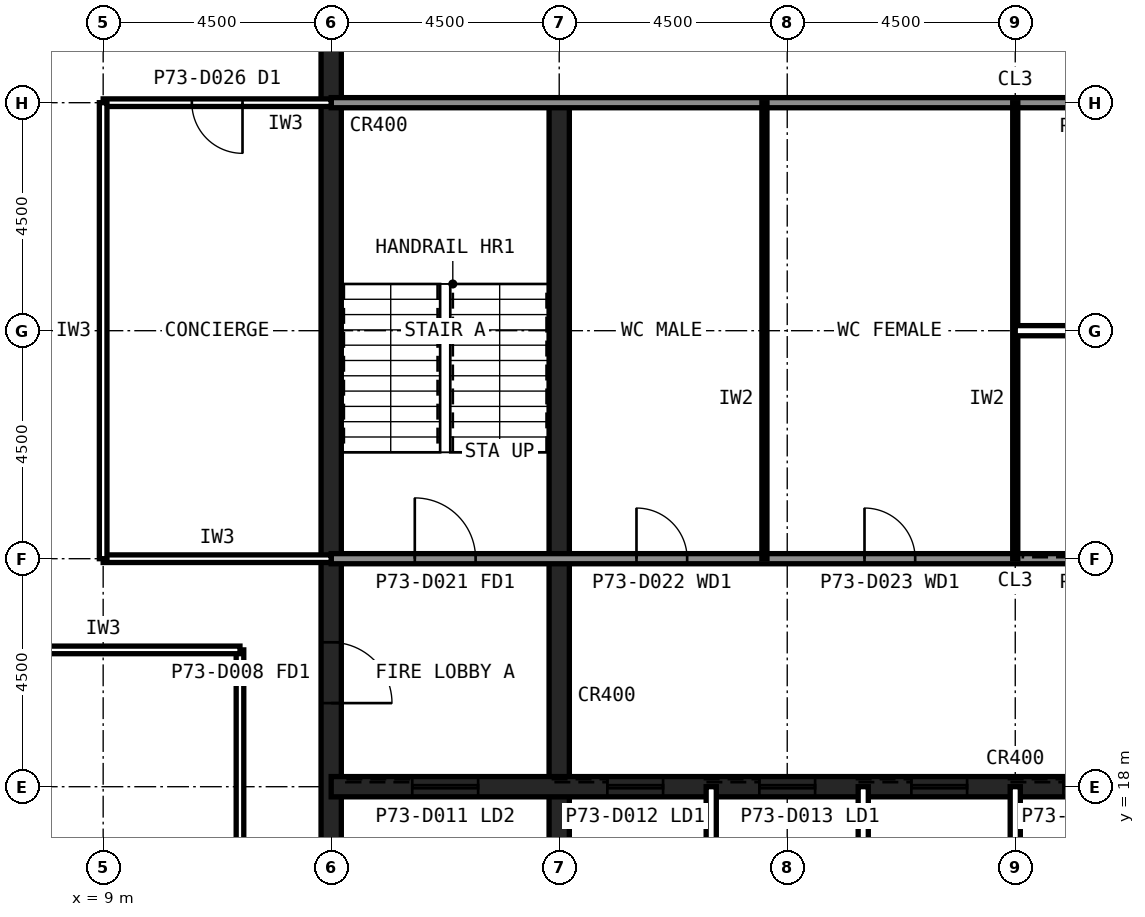
"""IFC4 building model, lengths in metres.
Left out: names, types, materials, properties, quantities, classifications, styles, units other than length and angle.
Written with IfcOpenShell. Run it as: python <this file> out.ifc"""

import sys

from ifc_helpers import new_model, si_unit, direction, frame, frame_2d, origin, place, context, subcontext, project, spatial, rectangle, extrude, element, fill, save


model = new_model("IFC4")
c1 = context("Model", 3, precision=1e-05, world=origin(), true_north=direction((0.0, 1.0)))
c2 = subcontext(c1, "Body", "Model", "MODEL_VIEW")
j1 = project(units=[si_unit("LENGTHUNIT", "METRE"), si_unit("PLANEANGLEUNIT", "RADIAN")], contexts=[c1])
p1 = place(None, origin())
s1 = spatial("IfcSite", under=j1, at=p1, CompositionType="ELEMENT")
p2 = place(p1, origin())
s2 = spatial("IfcBuilding", under=s1, at=p2, CompositionType="ELEMENT")
p3 = place(p2, frame((0.0, 0.0, 302.6)))
s3 = spatial("IfcBuildingStorey", under=s2, at=p3, CompositionType="ELEMENT", Elevation=302.6)
p4 = place(p3, frame((13.5, 40.5, 0.0), z_axis=(0.0, 0.0, 1.0), x_axis=(0.0, -1.0, 0.0)))
e1 = element("IfcWall", 1, at=p4, inside=s3, PredefinedType="SHEAR", context=c2, shape_type="SweptSolid", body=[
    extrude(rectangle(XDim=27.0, YDim=0.4, at=frame_2d((13.5, 0.0))), origin(), (0.0, 0.0, 1.0), 4.0),
])
p5 = place(p4, frame((19.65, 0.0, 0.0)))
e2 = element("IfcOpeningElement", 2, at=p5, cuts=e1, PredefinedType="OPENING", context=c2, shape_type="SweptSolid", body=[
    extrude(rectangle(XDim=1.2, YDim=2.1, at=frame_2d((0.6, 1.05))), frame((0.0, 0.21, 0.0), z_axis=(0.0, -1.0, 0.0), x_axis=(1.0, 0.0, 0.0)), (0.0, 0.0, 1.0), 0.42),
])
p6 = place(p4, frame((5.85, 0.0, 0.0)))
e3 = element("IfcOpeningElement", 3, at=p6, cuts=e1, PredefinedType="OPENING", context=c2, shape_type="SweptSolid", body=[
    extrude(rectangle(XDim=1.8, YDim=2.1, at=frame_2d((0.9, 1.05))), frame((0.0, 0.21, 0.0), z_axis=(0.0, -1.0, 0.0), x_axis=(1.0, 0.0, 0.0)), (0.0, 0.0, 1.0), 0.42),
])
p7 = place(p3, frame((18.0, 13.5, 0.0), z_axis=(0.0, 0.0, 1.0), x_axis=(0.0, 1.0, 0.0)))
e4 = element("IfcWall", 4, at=p7, inside=s3, PredefinedType="SHEAR", context=c2, shape_type="SweptSolid", body=[
    extrude(rectangle(XDim=18.0, YDim=0.4, at=frame_2d((9.0, 0.0))), origin(), (0.0, 0.0, 1.0), 4.0),
])
p8 = place(p3, frame((13.5, 18.0, 0.0), z_axis=(0.0, 0.0, 1.0), x_axis=(1.0, 0.0, 0.0)))
e5 = element("IfcWall", 5, at=p8, inside=s3, PredefinedType="SHEAR", context=c2, shape_type="SweptSolid", body=[
    extrude(rectangle(XDim=27.0, YDim=0.4, at=frame_2d((13.5, 0.0))), origin(), (0.0, 0.0, 1.0), 4.0),
])
p9 = place(p8, frame((24.3, 0.0, 0.0)))
e6 = element("IfcOpeningElement", 6, at=p9, cuts=e5, PredefinedType="OPENING", context=c2, shape_type="SweptSolid", body=[
    extrude(rectangle(XDim=0.9, YDim=2.1, at=frame_2d((0.45, 1.05))), frame((0.0, 0.21, 0.0), z_axis=(0.0, -1.0, 0.0), x_axis=(1.0, 0.0, 0.0)), (0.0, 0.0, 1.0), 0.42),
])
p10 = place(p8, frame((5.45, 0.0, 0.0)))
e7 = element("IfcOpeningElement", 7, at=p10, cuts=e5, PredefinedType="OPENING", context=c2, shape_type="SweptSolid", body=[
    extrude(rectangle(XDim=1.1, YDim=2.1, at=frame_2d((0.55, 1.05))), frame((0.0, 0.21, 0.0), z_axis=(0.0, -1.0, 0.0), x_axis=(1.0, 0.0, 0.0)), (0.0, 0.0, 1.0), 0.42),
])
p11 = place(p8, frame((8.45, 0.0, 0.0)))
e8 = element("IfcOpeningElement", 8, at=p11, cuts=e5, PredefinedType="OPENING", context=c2, shape_type="SweptSolid", body=[
    extrude(rectangle(XDim=1.1, YDim=2.1, at=frame_2d((0.55, 1.05))), frame((0.0, 0.21, 0.0), z_axis=(0.0, -1.0, 0.0), x_axis=(1.0, 0.0, 0.0)), (0.0, 0.0, 1.0), 0.42),
])
p12 = place(p8, frame((11.45, 0.0, 0.0)))
e9 = element("IfcOpeningElement", 9, at=p12, cuts=e5, PredefinedType="OPENING", context=c2, shape_type="SweptSolid", body=[
    extrude(rectangle(XDim=1.1, YDim=2.1, at=frame_2d((0.55, 1.05))), frame((0.0, 0.21, 0.0), z_axis=(0.0, -1.0, 0.0), x_axis=(1.0, 0.0, 0.0)), (0.0, 0.0, 1.0), 0.42),
])
p13 = place(p8, frame((14.45, 0.0, 0.0)))
e10 = element("IfcOpeningElement", 10, at=p13, cuts=e5, PredefinedType="OPENING", context=c2, shape_type="SweptSolid", body=[
    extrude(rectangle(XDim=1.1, YDim=2.1, at=frame_2d((0.55, 1.05))), frame((0.0, 0.21, 0.0), z_axis=(0.0, -1.0, 0.0), x_axis=(1.0, 0.0, 0.0)), (0.0, 0.0, 1.0), 0.42),
])
p14 = place(p8, frame((17.45, 0.0, 0.0)))
e11 = element("IfcOpeningElement", 11, at=p14, cuts=e5, PredefinedType="OPENING", context=c2, shape_type="SweptSolid", body=[
    extrude(rectangle(XDim=1.1, YDim=2.1, at=frame_2d((0.55, 1.05))), frame((0.0, 0.21, 0.0), z_axis=(0.0, -1.0, 0.0), x_axis=(1.0, 0.0, 0.0)), (0.0, 0.0, 1.0), 0.42),
])
p15 = place(p8, frame((20.45, 0.0, 0.0)))
e12 = element("IfcOpeningElement", 12, at=p15, cuts=e5, PredefinedType="OPENING", context=c2, shape_type="SweptSolid", body=[
    extrude(rectangle(XDim=1.1, YDim=2.1, at=frame_2d((0.55, 1.05))), frame((0.0, 0.21, 0.0), z_axis=(0.0, -1.0, 0.0), x_axis=(1.0, 0.0, 0.0)), (0.0, 0.0, 1.0), 0.42),
])
p16 = place(p8, frame((1.6, 0.0, 0.0)))
e13 = element("IfcOpeningElement", 13, at=p16, cuts=e5, PredefinedType="OPENING", context=c2, shape_type="SweptSolid", body=[
    extrude(rectangle(XDim=1.3, YDim=2.2, at=frame_2d((0.65, 1.1))), frame((0.0, 0.21, 0.0), z_axis=(0.0, -1.0, 0.0), x_axis=(1.0, 0.0, 0.0)), (0.0, 0.0, 1.0), 0.42),
])
p17 = place(p3, frame((13.5, 22.5, 0.0), z_axis=(0.0, 0.0, 1.0), x_axis=(1.0, 0.0, 0.0)))
e14 = element("IfcWall", 14, at=p17, inside=s3, PredefinedType="SOLIDWALL", context=c2, shape_type="SweptSolid", body=[
    extrude(rectangle(XDim=27.0, YDim=0.2, at=frame_2d((13.5, 0.0))), origin(), (0.0, 0.0, 1.0), 3.84),
])
p18 = place(p17, frame((1.65, 0.0, 0.0)))
e15 = element("IfcOpeningElement", 15, at=p18, cuts=e14, PredefinedType="OPENING", context=c2, shape_type="SweptSolid", body=[
    extrude(rectangle(XDim=1.2, YDim=2.1, at=frame_2d((0.6, 1.05))), frame((0.0, 0.11, 0.0), z_axis=(0.0, -1.0, 0.0), x_axis=(1.0, 0.0, 0.0)), (0.0, 0.0, 1.0), 0.22),
])
p19 = place(p17, frame((6.025, 0.0, 0.0)))
e16 = element("IfcOpeningElement", 16, at=p19, cuts=e14, PredefinedType="OPENING", context=c2, shape_type="SweptSolid", body=[
    extrude(rectangle(XDim=1.0, YDim=2.1, at=frame_2d((0.5, 1.05))), frame((0.0, 0.11, 0.0), z_axis=(0.0, -1.0, 0.0), x_axis=(1.0, 0.0, 0.0)), (0.0, 0.0, 1.0), 0.22),
])
p20 = place(p17, frame((10.525, 0.0, 0.0)))
e17 = element("IfcOpeningElement", 17, at=p20, cuts=e14, PredefinedType="OPENING", context=c2, shape_type="SweptSolid", body=[
    extrude(rectangle(XDim=1.0, YDim=2.1, at=frame_2d((0.5, 1.05))), frame((0.0, 0.11, 0.0), z_axis=(0.0, -1.0, 0.0), x_axis=(1.0, 0.0, 0.0)), (0.0, 0.0, 1.0), 0.22),
])
p21 = place(p17, frame((19.75, 0.0, 0.0)))
e18 = element("IfcOpeningElement", 18, at=p21, cuts=e14, PredefinedType="OPENING", context=c2, shape_type="SweptSolid", body=[
    extrude(rectangle(XDim=1.0, YDim=2.1, at=frame_2d((0.5, 1.05))), frame((0.0, 0.11, 0.0), z_axis=(0.0, -1.0, 0.0), x_axis=(1.0, 0.0, 0.0)), (0.0, 0.0, 1.0), 0.22),
])
p22 = place(p17, frame((15.05, 0.0, 0.0)))
e19 = element("IfcOpeningElement", 19, at=p22, cuts=e14, PredefinedType="OPENING", context=c2, shape_type="SweptSolid", body=[
    extrude(rectangle(XDim=1.4, YDim=2.4, at=frame_2d((0.7, 1.2))), frame((0.0, 0.11, 0.0), z_axis=(0.0, -1.0, 0.0), x_axis=(1.0, 0.0, 0.0)), (0.0, 0.0, 1.0), 0.22),
])
p23 = place(p3, frame((13.5, 31.5, 0.0), z_axis=(0.0, 0.0, 1.0), x_axis=(1.0, 0.0, 0.0)))
e20 = element("IfcWall", 20, at=p23, inside=s3, PredefinedType="SOLIDWALL", context=c2, shape_type="SweptSolid", body=[
    extrude(rectangle(XDim=27.0, YDim=0.2, at=frame_2d((13.5, 0.0))), origin(), (0.0, 0.0, 1.0), 3.84),
])
p24 = place(p23, frame((24.15, 0.0, 0.0)))
e21 = element("IfcOpeningElement", 21, at=p24, cuts=e20, PredefinedType="OPENING", context=c2, shape_type="SweptSolid", body=[
    extrude(rectangle(XDim=1.2, YDim=2.1, at=frame_2d((0.6, 1.05))), frame((0.0, 0.11, 0.0), z_axis=(0.0, -1.0, 0.0), x_axis=(1.0, 0.0, 0.0)), (0.0, 0.0, 1.0), 0.22),
])
p25 = place(p23, frame((15.3, 0.0, 0.0)))
e22 = element("IfcOpeningElement", 22, at=p25, cuts=e20, PredefinedType="OPENING", context=c2, shape_type="SweptSolid", body=[
    extrude(rectangle(XDim=0.9, YDim=2.1, at=frame_2d((0.45, 1.05))), frame((0.0, 0.11, 0.0), z_axis=(0.0, -1.0, 0.0), x_axis=(1.0, 0.0, 0.0)), (0.0, 0.0, 1.0), 0.22),
])
p26 = place(p23, frame((19.8, 0.0, 0.0)))
e23 = element("IfcOpeningElement", 23, at=p26, cuts=e20, PredefinedType="OPENING", context=c2, shape_type="SweptSolid", body=[
    extrude(rectangle(XDim=0.9, YDim=2.1, at=frame_2d((0.45, 1.05))), frame((0.0, 0.11, 0.0), z_axis=(0.0, -1.0, 0.0), x_axis=(1.0, 0.0, 0.0)), (0.0, 0.0, 1.0), 0.22),
])
for number, where, z_axis, x_axis in (
    (24, (21.0, 13.5, 0.0), (0.0, 0.0, 1.0), (0.0, 1.0, 0.0)),
    (25, (24.0, 13.5, 0.0), (0.0, 0.0, 1.0), (0.0, 1.0, 0.0)),
    (26, (27.0, 13.5, 0.0), (0.0, 0.0, 1.0), (0.0, 1.0, 0.0)),
):
    element("IfcWall", number, at=place(p3, frame(where, z_axis=z_axis, x_axis=x_axis)), inside=s3, PredefinedType="PARTITIONING", context=c2, shape_type="SweptSolid", body=[
        extrude(rectangle(XDim=4.5, YDim=0.2, at=frame_2d((2.25, 0.0))), origin(), (0.0, 0.0, 1.0), 3.84),
    ])
for number, where, z_axis, x_axis in (
    (27, (22.05, 22.5, 0.0), (0.0, 0.0, 1.0), (0.0, 1.0, 0.0)),
    (28, (27.0, 22.5, 0.0), (0.0, 0.0, 1.0), (0.0, 1.0, 0.0)),
):
    element("IfcWall", number, at=place(p3, frame(where, z_axis=z_axis, x_axis=x_axis)), inside=s3, PredefinedType="PLUMBINGWALL", context=c2, shape_type="SweptSolid", body=[
        extrude(rectangle(XDim=9.0, YDim=0.1, at=frame_2d((4.5, 0.0))), origin(), (0.0, 0.0, 1.0), 3.84),
    ])
p27 = place(p3, frame((27.0, 27.0, 0.0), z_axis=(0.0, 0.0, 1.0), x_axis=(1.0, 0.0, 0.0)))
e29 = element("IfcWall", 29, at=p27, inside=s3, PredefinedType="PARTITIONING", context=c2, shape_type="SweptSolid", body=[
    extrude(rectangle(XDim=9.0, YDim=0.2, at=frame_2d((4.5, 0.0))), origin(), (0.0, 0.0, 1.0), 3.84),
])
p28 = place(p3, frame((11.7, 20.7, 0.0), z_axis=(0.0, 0.0, 1.0), x_axis=(0.0, -1.0, 0.0)))
e30 = element("IfcWall", 30, at=p28, inside=s3, PredefinedType="PARTITIONING", context=c2, shape_type="SweptSolid", body=[
    extrude(rectangle(XDim=9.0, YDim=0.15, at=frame_2d((4.5, 0.0))), origin(), (0.0, 0.0, 1.0), 3.84),
])
p29 = place(p3, frame((6.3, 20.7, 0.0), z_axis=(0.0, 0.0, 1.0), x_axis=(1.0, 0.0, 0.0)))
e31 = element("IfcWall", 31, at=p29, inside=s3, PredefinedType="PARTITIONING", context=c2, shape_type="SweptSolid", body=[
    extrude(rectangle(XDim=5.4, YDim=0.15, at=frame_2d((2.7, 0.0))), origin(), (0.0, 0.0, 1.0), 3.84),
])
p30 = place(p3, frame((9.0, 22.5, 0.0), z_axis=(0.0, 0.0, 1.0), x_axis=(1.0, 0.0, 0.0)))
e32 = element("IfcWall", 32, at=p30, inside=s3, PredefinedType="PARTITIONING", context=c2, shape_type="SweptSolid", body=[
    extrude(rectangle(XDim=4.5, YDim=0.15, at=frame_2d((2.25, 0.0))), origin(), (0.0, 0.0, 1.0), 2.989),
])
p31 = place(p3, frame((13.5, 31.5, 0.0), z_axis=(0.0, 0.0, 1.0), x_axis=(-1.0, 0.0, 0.0)))
e33 = element("IfcWall", 33, at=p31, inside=s3, PredefinedType="PARTITIONING", context=c2, shape_type="SweptSolid", body=[
    extrude(rectangle(XDim=4.5, YDim=0.15, at=frame_2d((2.25, 0.0))), origin(), (0.0, 0.0, 1.0), 2.989),
])
p32 = place(p31, frame((1.75, 0.0, 0.0)))
e34 = element("IfcOpeningElement", 34, at=p32, cuts=e33, PredefinedType="OPENING", context=c2, shape_type="SweptSolid", body=[
    extrude(rectangle(XDim=1.0, YDim=2.1, at=frame_2d((0.5, 1.05))), frame((0.0, 0.085, 0.0), z_axis=(0.0, -1.0, 0.0), x_axis=(1.0, 0.0, 0.0)), (0.0, 0.0, 1.0), 0.17),
])
p33 = place(p3, frame((9.0, 31.5, 0.0), z_axis=(0.0, 0.0, 1.0), x_axis=(0.0, -1.0, 0.0)))
e35 = element("IfcWall", 35, at=p33, inside=s3, PredefinedType="PARTITIONING", context=c2, shape_type="SweptSolid", body=[
    extrude(rectangle(XDim=9.0, YDim=0.15, at=frame_2d((4.5, 0.0))), origin(), (0.0, 0.0, 1.0), 3.84),
])
p34 = place(p5, origin())
e36 = element("IfcDoor", 36, at=p34, inside=s3, OperationType="SINGLE_SWING_RIGHT", PredefinedType="DOOR", context=c2, shape_type="SweptSolid", body=[
    extrude(rectangle(XDim=1.2, YDim=2.1, at=frame_2d((0.6, 1.05))), frame((0.0, 0.025, 0.0), z_axis=(0.0, -1.0, 0.0), x_axis=(1.0, 0.0, 0.0)), (0.0, 0.0, 1.0), 0.05),
])
fill(e2, e36)
p35 = place(p18, origin())
e37 = element("IfcDoor", 37, at=p35, inside=s3, OperationType="SINGLE_SWING_LEFT", PredefinedType="DOOR", context=c2, shape_type="SweptSolid", body=[
    extrude(rectangle(XDim=1.2, YDim=2.1, at=frame_2d((0.6, 1.05))), frame((0.0, 0.025, 0.0), z_axis=(0.0, -1.0, 0.0), x_axis=(1.0, 0.0, 0.0)), (0.0, 0.0, 1.0), 0.05),
])
fill(e15, e37)
p36 = place(p19, origin())
e38 = element("IfcDoor", 38, at=p36, inside=s3, OperationType="SINGLE_SWING_LEFT", PredefinedType="DOOR", context=c2, shape_type="SweptSolid", body=[
    extrude(rectangle(XDim=1.0, YDim=2.1, at=frame_2d((0.5, 1.05))), frame((0.0, 0.025, 0.0), z_axis=(0.0, -1.0, 0.0), x_axis=(1.0, 0.0, 0.0)), (0.0, 0.0, 1.0), 0.05),
])
fill(e16, e38)
p37 = place(p20, origin())
e39 = element("IfcDoor", 39, at=p37, inside=s3, OperationType="SINGLE_SWING_LEFT", PredefinedType="DOOR", context=c2, shape_type="SweptSolid", body=[
    extrude(rectangle(XDim=1.0, YDim=2.1, at=frame_2d((0.5, 1.05))), frame((0.0, 0.025, 0.0), z_axis=(0.0, -1.0, 0.0), x_axis=(1.0, 0.0, 0.0)), (0.0, 0.0, 1.0), 0.05),
])
fill(e17, e39)
p38 = place(p10, origin())
e40 = element("IfcDoor", 40, at=p38, inside=s3, OperationType="SLIDING_TO_LEFT", PredefinedType="DOOR", context=c2, shape_type="SweptSolid", body=[
    extrude(rectangle(XDim=1.1, YDim=2.1, at=frame_2d((0.55, 1.05))), frame((0.0, 0.025, 0.0), z_axis=(0.0, -1.0, 0.0), x_axis=(1.0, 0.0, 0.0)), (0.0, 0.0, 1.0), 0.05),
])
fill(e7, e40)
p39 = place(p11, origin())
e41 = element("IfcDoor", 41, at=p39, inside=s3, OperationType="SLIDING_TO_LEFT", PredefinedType="DOOR", context=c2, shape_type="SweptSolid", body=[
    extrude(rectangle(XDim=1.1, YDim=2.1, at=frame_2d((0.55, 1.05))), frame((0.0, 0.025, 0.0), z_axis=(0.0, -1.0, 0.0), x_axis=(1.0, 0.0, 0.0)), (0.0, 0.0, 1.0), 0.05),
])
fill(e8, e41)
p40 = place(p12, origin())
e42 = element("IfcDoor", 42, at=p40, inside=s3, OperationType="SLIDING_TO_LEFT", PredefinedType="DOOR", context=c2, shape_type="SweptSolid", body=[
    extrude(rectangle(XDim=1.1, YDim=2.1, at=frame_2d((0.55, 1.05))), frame((0.0, 0.025, 0.0), z_axis=(0.0, -1.0, 0.0), x_axis=(1.0, 0.0, 0.0)), (0.0, 0.0, 1.0), 0.05),
])
fill(e9, e42)
p41 = place(p13, origin())
e43 = element("IfcDoor", 43, at=p41, inside=s3, OperationType="SLIDING_TO_LEFT", PredefinedType="DOOR", context=c2, shape_type="SweptSolid", body=[
    extrude(rectangle(XDim=1.1, YDim=2.1, at=frame_2d((0.55, 1.05))), frame((0.0, 0.025, 0.0), z_axis=(0.0, -1.0, 0.0), x_axis=(1.0, 0.0, 0.0)), (0.0, 0.0, 1.0), 0.05),
])
fill(e10, e43)
p42 = place(p16, origin())
e44 = element("IfcDoor", 44, at=p42, inside=s3, OperationType="SLIDING_TO_LEFT", PredefinedType="DOOR", context=c2, shape_type="SweptSolid", body=[
    extrude(rectangle(XDim=1.3, YDim=2.2, at=frame_2d((0.65, 1.1))), frame((0.0, 0.025, 0.0), z_axis=(0.0, -1.0, 0.0), x_axis=(1.0, 0.0, 0.0)), (0.0, 0.0, 1.0), 0.05),
])
fill(e13, e44)
p43 = place(p32, origin())
e45 = element("IfcDoor", 45, at=p43, inside=s3, OperationType="SINGLE_SWING_LEFT", PredefinedType="DOOR", context=c2, shape_type="SweptSolid", body=[
    extrude(rectangle(XDim=1.0, YDim=2.1, at=frame_2d((0.5, 1.05))), frame((0.0, 0.025, 0.0), z_axis=(0.0, -1.0, 0.0), x_axis=(1.0, 0.0, 0.0)), (0.0, 0.0, 1.0), 0.05),
])
fill(e34, e45)
save(model, sys.argv[1])
